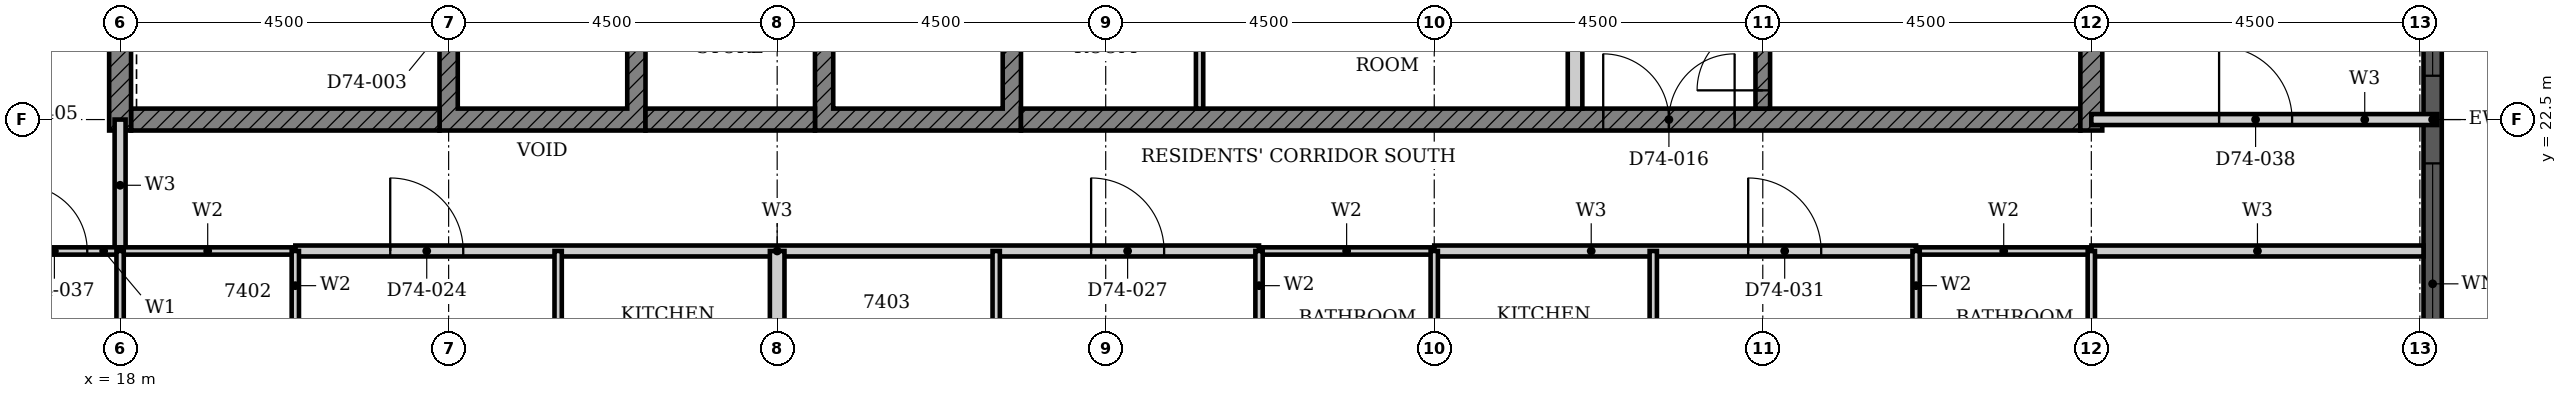
"""IFC4 building model, lengths in metres.
Left out: names, types, materials, properties, quantities, classifications, styles, units other than length and angle.
Written with IfcOpenShell. Run it as: python <this file> out.ifc"""

import sys

from ifc_helpers import new_model, si_unit, direction, frame, frame_2d, origin, place, context, subcontext, project, spatial, polyline, rectangle, outline, extrude, element, fill, save


model = new_model("IFC4")
c1 = context("Model", 3, precision=1e-05, world=origin(), true_north=direction((0.0, 1.0)))
c2 = subcontext(c1, "Body", "Model", "MODEL_VIEW")
j1 = project(units=[si_unit("LENGTHUNIT", "METRE"), si_unit("PLANEANGLEUNIT", "RADIAN")], contexts=[c1])
p1 = place(None, origin())
s1 = spatial("IfcSite", under=j1, at=p1, CompositionType="ELEMENT")
p2 = place(p1, origin())
s2 = spatial("IfcBuilding", under=s1, at=p2, CompositionType="ELEMENT")
p3 = place(p2, frame((0.0, 0.0, 290.8)))
s3 = spatial("IfcBuildingStorey", under=s2, at=p3, CompositionType="ELEMENT", Elevation=290.8)
p4 = place(p3, frame((49.675, 18.3, 0.0), z_axis=(0.0, 0.0, 1.0), x_axis=(0.0, 1.0, 0.0)))
e1 = element("IfcWall", 1, at=p4, inside=s3, PredefinedType="SOLIDWALL", context=c2, shape_type="SweptSolid", body=[
    extrude(rectangle(XDim=8.4, YDim=0.25, at=frame_2d((4.2, 0.0))), origin(), (0.0, 0.0, 1.0), 3.7),
])
p5 = place(p4, frame((0.3, 0.0, 0.45)))
e2 = element("IfcOpeningElement", 2, at=p5, cuts=e1, PredefinedType="OPENING", context=c2, shape_type="SweptSolid", body=[
    extrude(rectangle(XDim=3.3, YDim=2.3, at=frame_2d((1.65, 1.15))), frame((0.0, 0.135, 0.0), z_axis=(0.0, -1.0, 0.0), x_axis=(1.0, 0.0, 0.0)), (0.0, 0.0, 1.0), 0.27),
])
p6 = place(p4, frame((4.8, 0.0, 0.45)))
e3 = element("IfcOpeningElement", 3, at=p6, cuts=e1, PredefinedType="OPENING", context=c2, shape_type="SweptSolid", body=[
    extrude(rectangle(XDim=3.3, YDim=2.3, at=frame_2d((1.65, 1.15))), frame((0.0, 0.135, 0.0), z_axis=(0.0, -1.0, 0.0), x_axis=(1.0, 0.0, 0.0)), (0.0, 0.0, 1.0), 0.27),
])
p7 = place(p3, origin())
e4 = element("IfcWall", 4, at=p7, inside=s3, PredefinedType="SHEAR", context=c2, shape_type="SweptSolid", body=[
    extrude(outline(polyline([(22.375, 22.35), (25.197, 22.35), (25.197, 25.275), (24.947, 25.275), (24.947, 22.65), (22.625, 22.65), (22.625, 25.275), (22.375, 25.275), (22.375, 22.35)])), origin(), (0.0, 0.0, 1.0), 3.4),
])
p8 = place(p3, origin())
e5 = element("IfcWall", 5, at=p8, inside=s3, PredefinedType="SHEAR", context=c2, shape_type="SweptSolid", body=[
    extrude(outline(polyline([(27.518, 22.35), (30.339, 22.35), (30.339, 25.275), (30.089, 25.275), (30.089, 22.65), (27.768, 22.65), (27.768, 25.275), (27.518, 25.275), (27.518, 22.35)])), origin(), (0.0, 0.0, 1.0), 3.4),
])
p9 = place(p3, frame((18.15, 22.5, 0.0), z_axis=(0.0, 0.0, 1.0), x_axis=(1.0, 0.0, 0.0)))
e6 = element("IfcWall", 6, at=p9, inside=s3, PredefinedType="SHEAR", context=c2, shape_type="SweptSolid", body=[
    extrude(rectangle(XDim=4.225, YDim=0.3, at=frame_2d((2.113, 0.0))), origin(), (0.0, 0.0, 1.0), 3.4),
])
p10 = place(p3, frame((25.197, 22.5, 0.0), z_axis=(0.0, 0.0, 1.0), x_axis=(1.0, 0.0, 0.0)))
e7 = element("IfcWall", 7, at=p10, inside=s3, PredefinedType="SHEAR", context=c2, shape_type="SweptSolid", body=[
    extrude(rectangle(XDim=2.321, YDim=0.3, at=frame_2d((1.161, 0.0))), origin(), (0.0, 0.0, 1.0), 3.4),
])
p11 = place(p3, frame((30.339, 22.5, 0.0), z_axis=(0.0, 0.0, 1.0), x_axis=(1.0, 0.0, 0.0)))
e8 = element("IfcWall", 8, at=p11, inside=s3, PredefinedType="SHEAR", context=c2, shape_type="SweptSolid", body=[
    extrude(rectangle(XDim=14.511, YDim=0.3, at=frame_2d((7.255, 0.0))), origin(), (0.0, 0.0, 1.0), 3.4),
])
p12 = place(p11, frame((7.975, 0.0, 0.0)))
e9 = element("IfcOpeningElement", 9, at=p12, cuts=e8, PredefinedType="OPENING", context=c2, shape_type="SweptSolid", body=[
    extrude(rectangle(XDim=1.8, YDim=2.1, at=frame_2d((0.9, 1.05))), frame((0.0, 0.16, 0.0), z_axis=(0.0, -1.0, 0.0), x_axis=(1.0, 0.0, 0.0)), (0.0, 0.0, 1.0), 0.32),
])
for number, where, z_axis, x_axis in (
    (10, (18.0, 22.35, 0.0), (0.0, 0.0, 1.0), (0.0, 1.0, 0.0)),
    (11, (45.0, 22.35, 0.0), (0.0, 0.0, 1.0), (0.0, 1.0, 0.0)),
):
    element("IfcWall", number, at=place(p3, frame(where, z_axis=z_axis, x_axis=x_axis)), inside=s3, PredefinedType="SHEAR", context=c2, shape_type="SweptSolid", body=[
        extrude(rectangle(XDim=9.3, YDim=0.3, at=frame_2d((4.65, 0.0))), origin(), (0.0, 0.0, 1.0), 3.4),
    ])
p13 = place(p3, frame((37.928, 22.65, 0.0), z_axis=(0.0, 0.0, 1.0), x_axis=(0.0, 1.0, 0.0)))
e12 = element("IfcWall", 12, at=p13, inside=s3, PredefinedType="PARTITIONING", context=c2, shape_type="SweptSolid", body=[
    extrude(rectangle(XDim=2.625, YDim=0.2, at=frame_2d((1.312, 0.0))), origin(), (0.0, 0.0, 1.0), 3.4),
])
p14 = place(p3, frame((32.786, 22.65, 0.0), z_axis=(0.0, 0.0, 1.0), x_axis=(0.0, 1.0, 0.0)))
e13 = element("IfcWall", 13, at=p14, inside=s3, PredefinedType="PARTITIONING", context=c2, shape_type="SweptSolid", body=[
    extrude(rectangle(XDim=2.625, YDim=0.1, at=frame_2d((1.312, 0.0))), origin(), (0.0, 0.0, 1.0), 3.4),
])
p15 = place(p3, frame((40.5, 22.65, 0.0), z_axis=(0.0, 0.0, 1.0), x_axis=(0.0, 1.0, 0.0)))
e14 = element("IfcWall", 14, at=p15, inside=s3, PredefinedType="SHEAR", context=c2, shape_type="SweptSolid", body=[
    extrude(rectangle(XDim=5.825, YDim=0.2, at=frame_2d((2.913, 0.0))), origin(), (0.0, 0.0, 1.0), 3.4),
])
p16 = place(p15, frame((0.25, 0.0, 0.0)))
e15 = element("IfcOpeningElement", 15, at=p16, cuts=e14, PredefinedType="OPENING", context=c2, shape_type="SweptSolid", body=[
    extrude(rectangle(XDim=1.8, YDim=2.1, at=frame_2d((0.9, 1.05))), frame((0.0, 0.11, 0.0), z_axis=(0.0, -1.0, 0.0), x_axis=(1.0, 0.0, 0.0)), (0.0, 0.0, 1.0), 0.22),
])
p17 = place(p3, frame((20.4, 20.7, 0.0), z_axis=(0.0, 0.0, 1.0), x_axis=(1.0, 0.0, 0.0)))
e16 = element("IfcWall", 16, at=p17, inside=s3, PredefinedType="PARTITIONING", context=c2, shape_type="SweptSolid", body=[
    extrude(rectangle(XDim=13.2, YDim=0.15, at=frame_2d((6.6, 0.0))), origin(), (0.0, 0.0, 1.0), 3.4),
])
p18 = place(p17, frame((1.3, 0.0, 0.0)))
e17 = element("IfcOpeningElement", 17, at=p18, cuts=e16, PredefinedType="OPENING", context=c2, shape_type="SweptSolid", body=[
    extrude(rectangle(XDim=1.0, YDim=2.2, at=frame_2d((0.5, 1.1))), frame((0.0, 0.085, 0.0), z_axis=(0.0, -1.0, 0.0), x_axis=(1.0, 0.0, 0.0)), (0.0, 0.0, 1.0), 0.17),
])
p19 = place(p17, frame((10.9, 0.0, 0.0)))
e18 = element("IfcOpeningElement", 18, at=p19, cuts=e16, PredefinedType="OPENING", context=c2, shape_type="SweptSolid", body=[
    extrude(rectangle(XDim=1.0, YDim=2.2, at=frame_2d((0.5, 1.1))), frame((0.0, 0.085, 0.0), z_axis=(0.0, -1.0, 0.0), x_axis=(1.0, 0.0, 0.0)), (0.0, 0.0, 1.0), 0.17),
])
p20 = place(p3, frame((45.001, 20.7, 0.0), z_axis=(0.0, 0.0, 1.0), x_axis=(1.0, 0.0, 0.0)))
e19 = element("IfcWall", 19, at=p20, inside=s3, PredefinedType="PARTITIONING", context=c2, shape_type="SweptSolid", body=[
    extrude(rectangle(XDim=4.549, YDim=0.15, at=frame_2d((2.274, 0.0))), origin(), (0.0, 0.0, 1.0), 3.4),
])
p21 = place(p3, frame((36.0, 20.7, 0.0), z_axis=(0.0, 0.0, 1.0), x_axis=(1.0, 0.0, 0.0)))
e20 = element("IfcWall", 20, at=p21, inside=s3, PredefinedType="PARTITIONING", context=c2, shape_type="SweptSolid", body=[
    extrude(rectangle(XDim=6.6, YDim=0.15, at=frame_2d((3.3, 0.0))), origin(), (0.0, 0.0, 1.0), 3.4),
])
p22 = place(p21, frame((4.3, 0.0, 0.0)))
e21 = element("IfcOpeningElement", 21, at=p22, cuts=e20, PredefinedType="OPENING", context=c2, shape_type="SweptSolid", body=[
    extrude(rectangle(XDim=1.0, YDim=2.2, at=frame_2d((0.5, 1.1))), frame((0.0, 0.085, 0.0), z_axis=(0.0, -1.0, 0.0), x_axis=(1.0, 0.0, 0.0)), (0.0, 0.0, 1.0), 0.17),
])
p23 = place(p3, frame((45.0, 22.5, 0.0), z_axis=(0.0, 0.0, 1.0), x_axis=(1.0, 0.0, 0.0)))
e22 = element("IfcWall", 22, at=p23, inside=s3, PredefinedType="PARTITIONING", context=c2, shape_type="SweptSolid", body=[
    extrude(rectangle(XDim=4.74, YDim=0.15, at=frame_2d((2.37, 0.0))), origin(), (0.0, 0.0, 1.0), 3.4),
])
p24 = place(p23, frame((1.75, 0.0, 0.0)))
e23 = element("IfcOpeningElement", 23, at=p24, cuts=e22, PredefinedType="OPENING", context=c2, shape_type="SweptSolid", body=[
    extrude(rectangle(XDim=1.0, YDim=2.1, at=frame_2d((0.5, 1.05))), frame((0.0, 0.085, 0.0), z_axis=(0.0, -1.0, 0.0), x_axis=(1.0, 0.0, 0.0)), (0.0, 0.0, 1.0), 0.17),
])
p25 = place(p3, frame((18.0, 20.7, 0.0), z_axis=(0.0, 0.0, 1.0), x_axis=(0.0, 1.0, 0.0)))
e24 = element("IfcWall", 24, at=p25, inside=s3, PredefinedType="PARTITIONING", context=c2, shape_type="SweptSolid", body=[
    extrude(rectangle(XDim=1.8, YDim=0.15, at=frame_2d((0.9, 0.0))), origin(), (0.0, 0.0, 1.0), 3.4),
])
p26 = place(p3, frame((16.2, 20.7, 0.0), z_axis=(0.0, 0.0, 1.0), x_axis=(1.0, 0.0, 0.0)))
e25 = element("IfcWall", 25, at=p26, inside=s3, PredefinedType="PARTITIONING", context=c2, shape_type="SweptSolid", body=[
    extrude(rectangle(XDim=1.8, YDim=0.1, at=frame_2d((0.9, 0.0))), origin(), (0.0, 0.0, 1.0), 3.4),
])
p27 = place(p26, frame((0.45, 0.0, 0.0)))
e26 = element("IfcOpeningElement", 26, at=p27, cuts=e25, PredefinedType="OPENING", context=c2, shape_type="SweptSolid", body=[
    extrude(rectangle(XDim=0.9, YDim=2.1, at=frame_2d((0.45, 1.05))), frame((0.0, 0.06, 0.0), z_axis=(0.0, -1.0, 0.0), x_axis=(1.0, 0.0, 0.0)), (0.0, 0.0, 1.0), 0.12),
])
for number, where, z_axis, x_axis in (
    (27, (24.0, 18.0, 0.0), (0.0, 0.0, 1.0), (0.0, 1.0, 0.0)),
    (28, (30.0, 18.0, 0.0), (0.0, 0.0, 1.0), (0.0, 1.0, 0.0)),
    (29, (39.0, 18.0, 0.0), (0.0, 0.0, 1.0), (0.0, 1.0, 0.0)),
):
    element("IfcWall", number, at=place(p3, frame(where, z_axis=z_axis, x_axis=x_axis)), inside=s3, PredefinedType="PARTITIONING", context=c2, shape_type="SweptSolid", body=[
        extrude(rectangle(XDim=2.7, YDim=0.1, at=frame_2d((1.35, 0.0))), origin(), (0.0, 0.0, 1.0), 3.4),
    ])
p28 = place(p3, frame((27.0, 13.31, 0.0), z_axis=(0.0, 0.0, 1.0), x_axis=(0.0, 1.0, 0.0)))
e30 = element("IfcWall", 30, at=p28, inside=s3, PredefinedType="PARTITIONING", context=c2, shape_type="SweptSolid", body=[
    extrude(rectangle(XDim=7.39, YDim=0.2, at=frame_2d((3.695, 0.0))), origin(), (0.0, 0.0, 1.0), 3.4),
])
for number, where, z_axis, x_axis in (
    (31, (18.0, 20.7, 0.0), (0.0, 0.0, 1.0), (1.0, 0.0, 0.0)),
    (32, (33.6, 20.7, 0.0), (0.0, 0.0, 1.0), (1.0, 0.0, 0.0)),
    (33, (42.6, 20.7, 0.0), (0.0, 0.0, 1.0), (1.0, 0.0, 0.0)),
):
    element("IfcWall", number, at=place(p3, frame(where, z_axis=z_axis, x_axis=x_axis)), inside=s3, PredefinedType="PARTITIONING", context=c2, shape_type="SweptSolid", body=[
        extrude(rectangle(XDim=2.4, YDim=0.1, at=frame_2d((1.2, 0.0))), origin(), (0.0, 0.0, 1.0), 3.4),
    ])
p29 = place(p3, frame((18.0, 18.0, 0.0), z_axis=(0.0, 0.0, 1.0), x_axis=(0.0, 1.0, 0.0)))
e34 = element("IfcWall", 34, at=p29, inside=s3, PredefinedType="PARTITIONING", context=c2, shape_type="SweptSolid", body=[
    extrude(rectangle(XDim=2.7, YDim=0.1, at=frame_2d((1.35, 0.0))), origin(), (0.0, 0.0, 1.0), 3.4),
])
p30 = place(p3, frame((20.4, 18.0, 0.0), z_axis=(0.0, 0.0, 1.0), x_axis=(0.0, 1.0, 0.0)))
e35 = element("IfcWall", 35, at=p30, inside=s3, PredefinedType="PARTITIONING", context=c2, shape_type="SweptSolid", body=[
    extrude(rectangle(XDim=2.7, YDim=0.1, at=frame_2d((1.35, 0.0))), origin(), (0.0, 0.0, 1.0), 3.4),
])
p31 = place(p30, frame((0.95, 0.0, 0.0)))
e36 = element("IfcOpeningElement", 36, at=p31, cuts=e35, PredefinedType="OPENING", context=c2, shape_type="SweptSolid", body=[
    extrude(rectangle(XDim=0.8, YDim=2.1, at=frame_2d((0.4, 1.05))), frame((0.0, 0.06, 0.0), z_axis=(0.0, -1.0, 0.0), x_axis=(1.0, 0.0, 0.0)), (0.0, 0.0, 1.0), 0.12),
])
p32 = place(p3, frame((33.6, 18.0, 0.0), z_axis=(0.0, 0.0, 1.0), x_axis=(0.0, 1.0, 0.0)))
e37 = element("IfcWall", 37, at=p32, inside=s3, PredefinedType="PARTITIONING", context=c2, shape_type="SweptSolid", body=[
    extrude(rectangle(XDim=2.7, YDim=0.1, at=frame_2d((1.35, 0.0))), origin(), (0.0, 0.0, 1.0), 3.4),
])
p33 = place(p32, frame((0.95, 0.0, 0.0)))
e38 = element("IfcOpeningElement", 38, at=p33, cuts=e37, PredefinedType="OPENING", context=c2, shape_type="SweptSolid", body=[
    extrude(rectangle(XDim=0.8, YDim=2.1, at=frame_2d((0.4, 1.05))), frame((0.0, 0.06, 0.0), z_axis=(0.0, -1.0, 0.0), x_axis=(1.0, 0.0, 0.0)), (0.0, 0.0, 1.0), 0.12),
])
p34 = place(p3, frame((36.0, 18.0, 0.0), z_axis=(0.0, 0.0, 1.0), x_axis=(0.0, 1.0, 0.0)))
e39 = element("IfcWall", 39, at=p34, inside=s3, PredefinedType="PARTITIONING", context=c2, shape_type="SweptSolid", body=[
    extrude(rectangle(XDim=2.7, YDim=0.1, at=frame_2d((1.35, 0.0))), origin(), (0.0, 0.0, 1.0), 3.4),
])
p35 = place(p3, frame((42.6, 18.0, 0.0), z_axis=(0.0, 0.0, 1.0), x_axis=(0.0, 1.0, 0.0)))
e40 = element("IfcWall", 40, at=p35, inside=s3, PredefinedType="PARTITIONING", context=c2, shape_type="SweptSolid", body=[
    extrude(rectangle(XDim=2.7, YDim=0.1, at=frame_2d((1.35, 0.0))), origin(), (0.0, 0.0, 1.0), 3.4),
])
p36 = place(p35, frame((0.95, 0.0, 0.0)))
e41 = element("IfcOpeningElement", 41, at=p36, cuts=e40, PredefinedType="OPENING", context=c2, shape_type="SweptSolid", body=[
    extrude(rectangle(XDim=0.8, YDim=2.1, at=frame_2d((0.4, 1.05))), frame((0.0, 0.06, 0.0), z_axis=(0.0, -1.0, 0.0), x_axis=(1.0, 0.0, 0.0)), (0.0, 0.0, 1.0), 0.12),
])
p37 = place(p3, frame((45.0, 18.0, 0.0), z_axis=(0.0, 0.0, 1.0), x_axis=(0.0, 1.0, 0.0)))
e42 = element("IfcWall", 42, at=p37, inside=s3, PredefinedType="PARTITIONING", context=c2, shape_type="SweptSolid", body=[
    extrude(rectangle(XDim=2.699, YDim=0.1, at=frame_2d((1.35, 0.0))), origin(), (0.0, 0.0, 1.0), 3.4),
])
p38 = place(p5, origin())
e43 = element("IfcWindow", 43, at=p38, inside=s3, PartitioningType="SINGLE_PANEL", PredefinedType="WINDOW", context=c2, shape_type="SweptSolid", body=[
    extrude(rectangle(XDim=3.3, YDim=2.3, at=frame_2d((1.65, 1.15))), frame((0.0, 0.03, 0.0), z_axis=(0.0, -1.0, 0.0), x_axis=(1.0, 0.0, 0.0)), (0.0, 0.0, 1.0), 0.06),
])
fill(e2, e43)
p39 = place(p6, origin())
e44 = element("IfcWindow", 44, at=p39, inside=s3, PartitioningType="SINGLE_PANEL", PredefinedType="WINDOW", context=c2, shape_type="SweptSolid", body=[
    extrude(rectangle(XDim=3.3, YDim=2.3, at=frame_2d((1.65, 1.15))), frame((0.0, 0.03, 0.0), z_axis=(0.0, -1.0, 0.0), x_axis=(1.0, 0.0, 0.0)), (0.0, 0.0, 1.0), 0.06),
])
fill(e3, e44)
p40 = place(p16, origin())
e45 = element("IfcDoor", 45, at=p40, inside=s3, OperationType="DOUBLE_DOOR_SINGLE_SWING", PredefinedType="DOOR", context=c2, shape_type="SweptSolid", body=[
    extrude(rectangle(XDim=1.8, YDim=2.1, at=frame_2d((0.9, 1.05))), frame((0.0, 0.025, 0.0), z_axis=(0.0, -1.0, 0.0), x_axis=(1.0, 0.0, 0.0)), (0.0, 0.0, 1.0), 0.05),
])
fill(e15, e45)
p41 = place(p12, origin())
e46 = element("IfcDoor", 46, at=p41, inside=s3, OperationType="DOUBLE_DOOR_SINGLE_SWING", PredefinedType="DOOR", context=c2, shape_type="SweptSolid", body=[
    extrude(rectangle(XDim=1.8, YDim=2.1, at=frame_2d((0.9, 1.05))), frame((0.0, 0.025, 0.0), z_axis=(0.0, -1.0, 0.0), x_axis=(1.0, 0.0, 0.0)), (0.0, 0.0, 1.0), 0.05),
])
fill(e9, e46)
p42 = place(p18, origin())
e47 = element("IfcDoor", 47, at=p42, inside=s3, OperationType="SINGLE_SWING_RIGHT", PredefinedType="DOOR", context=c2, shape_type="SweptSolid", body=[
    extrude(rectangle(XDim=1.0, YDim=2.2, at=frame_2d((0.5, 1.1))), frame((0.0, 0.025, 0.0), z_axis=(0.0, -1.0, 0.0), x_axis=(1.0, 0.0, 0.0)), (0.0, 0.0, 1.0), 0.05),
])
fill(e17, e47)
p43 = place(p19, origin())
e48 = element("IfcDoor", 48, at=p43, inside=s3, OperationType="SINGLE_SWING_LEFT", PredefinedType="DOOR", context=c2, shape_type="SweptSolid", body=[
    extrude(rectangle(XDim=1.0, YDim=2.2, at=frame_2d((0.5, 1.1))), frame((0.0, 0.025, 0.0), z_axis=(0.0, -1.0, 0.0), x_axis=(1.0, 0.0, 0.0)), (0.0, 0.0, 1.0), 0.05),
])
fill(e18, e48)
p44 = place(p22, origin())
e49 = element("IfcDoor", 49, at=p44, inside=s3, OperationType="SINGLE_SWING_RIGHT", PredefinedType="DOOR", context=c2, shape_type="SweptSolid", body=[
    extrude(rectangle(XDim=1.0, YDim=2.2, at=frame_2d((0.5, 1.1))), frame((0.0, 0.025, 0.0), z_axis=(0.0, -1.0, 0.0), x_axis=(1.0, 0.0, 0.0)), (0.0, 0.0, 1.0), 0.05),
])
fill(e21, e49)
p45 = place(p27, origin())
e50 = element("IfcDoor", 50, at=p45, inside=s3, OperationType="SINGLE_SWING_RIGHT", PredefinedType="DOOR", context=c2, shape_type="SweptSolid", body=[
    extrude(rectangle(XDim=0.9, YDim=2.1, at=frame_2d((0.45, 1.05))), frame((0.0, 0.025, 0.0), z_axis=(0.0, -1.0, 0.0), x_axis=(1.0, 0.0, 0.0)), (0.0, 0.0, 1.0), 0.05),
])
fill(e26, e50)
p46 = place(p24, origin())
e51 = element("IfcDoor", 51, at=p46, inside=s3, OperationType="SINGLE_SWING_LEFT", PredefinedType="DOOR", context=c2, shape_type="SweptSolid", body=[
    extrude(rectangle(XDim=1.0, YDim=2.1, at=frame_2d((0.5, 1.05))), frame((0.0, 0.025, 0.0), z_axis=(0.0, -1.0, 0.0), x_axis=(1.0, 0.0, 0.0)), (0.0, 0.0, 1.0), 0.05),
])
fill(e23, e51)
save(model, sys.argv[1])
